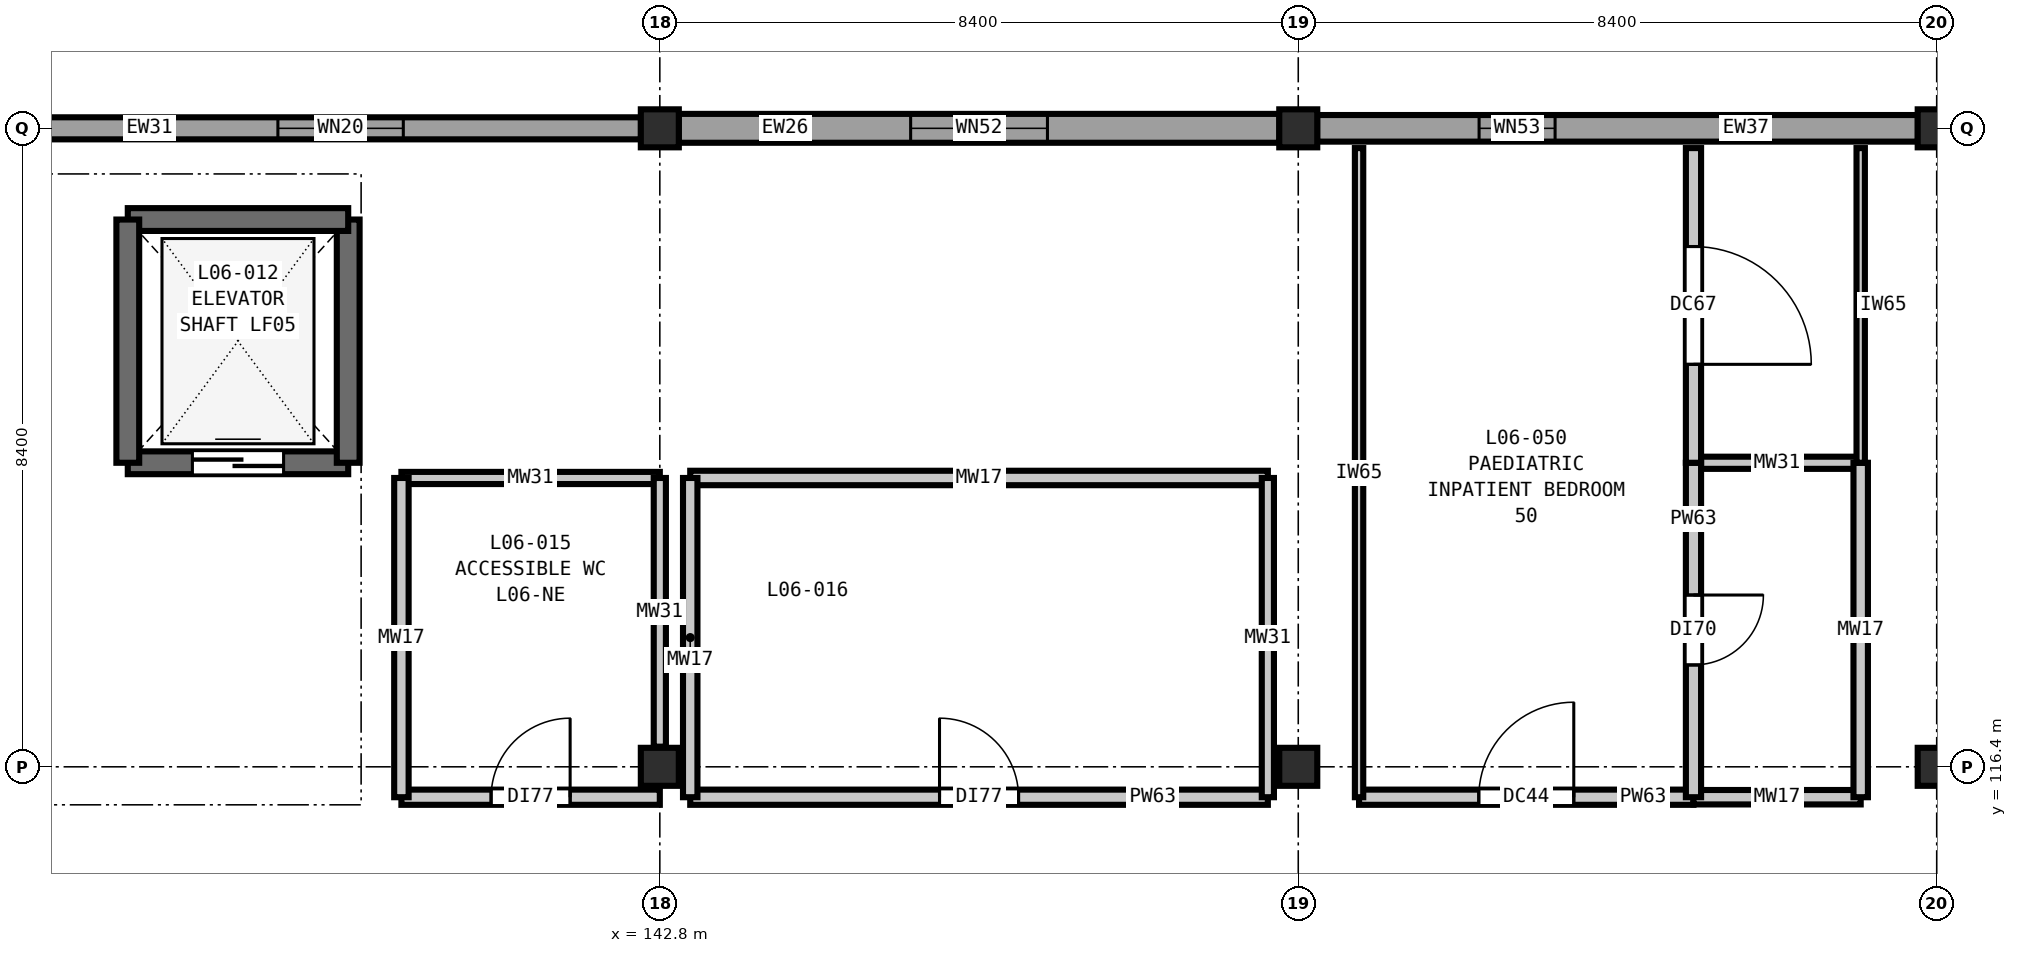
"""IFC4 building model, lengths in metres.
Left out: names, types, materials, properties, quantities, classifications, styles, units other than length and angle.
Written with IfcOpenShell. Run it as: python <this file> out.ifc"""

import sys

from ifc_helpers import new_model, si_unit, direction, frame, frame_2d, origin, origin_2d, place, context, subcontext, project, spatial, rectangle, extrude, element, fill, save


model = new_model("IFC4")
c1 = context("Model", 3, precision=1e-05, world=origin(), true_north=direction((0.0, 1.0)))
c2 = subcontext(c1, "Body", "Model", "MODEL_VIEW")
j1 = project(units=[si_unit("LENGTHUNIT", "METRE"), si_unit("PLANEANGLEUNIT", "RADIAN")], contexts=[c1])
p1 = place(None, origin())
s1 = spatial("IfcSite", under=j1, at=p1, CompositionType="ELEMENT")
p2 = place(p1, origin())
s2 = spatial("IfcBuilding", under=s1, at=p2, CompositionType="ELEMENT")
p3 = place(p2, frame((0.0, 0.0, 28.8)))
s3 = spatial("IfcBuildingStorey", under=s2, at=p3, CompositionType="ELEMENT", Elevation=28.8)
for number, where, z_axis, x_axis in (
    (1, (142.8, 116.4, 0.0), (0.0, 0.0, 1.0), (1.0, 0.0, 0.0)),
    (2, (142.8, 124.8, 0.0), (0.0, 0.0, 1.0), (1.0, 0.0, 0.0)),
    (3, (151.2, 116.4, 0.0), (0.0, 0.0, 1.0), (1.0, 0.0, 0.0)),
    (4, (151.2, 124.8, 0.0), (0.0, 0.0, 1.0), (1.0, 0.0, 0.0)),
    (5, (159.6, 116.4, 0.0), (0.0, 0.0, 1.0), (1.0, 0.0, 0.0)),
    (6, (159.6, 124.8, 0.0), (0.0, 0.0, 1.0), (1.0, 0.0, 0.0)),
):
    element("IfcColumn", number, at=place(p3, frame(where, z_axis=z_axis, x_axis=x_axis)), inside=s3, PredefinedType="COLUMN", context=c2, shape_type="SweptSolid", body=[
        extrude(rectangle(XDim=0.5, YDim=0.5, at=origin_2d()), origin(), (0.0, 0.0, 1.0), 4.2),
    ])
p4 = place(p3, frame((134.648, 124.8, 0.0), z_axis=(0.0, 0.0, 1.0), x_axis=(1.0, 0.0, 0.0)))
e7 = element("IfcWall", 7, at=p4, inside=s3, PredefinedType="SOLIDWALL", context=c2, shape_type="SweptSolid", body=[
    extrude(rectangle(XDim=7.904, YDim=0.29, at=frame_2d((3.952, 0.0))), origin(), (0.0, 0.0, 1.0), 3.48),
])
p5 = place(p4, frame((3.127, 0.0, 0.9)))
e8 = element("IfcOpeningElement", 8, at=p5, cuts=e7, PredefinedType="OPENING", context=c2, shape_type="SweptSolid", body=[
    extrude(rectangle(XDim=1.65, YDim=1.55, at=frame_2d((0.825, 0.775))), frame((0.0, 0.155, 0.0), z_axis=(0.0, -1.0, 0.0), x_axis=(1.0, 0.0, 0.0)), (0.0, 0.0, 1.0), 0.31),
])
p6 = place(p3, frame((143.048, 124.8, 0.0), z_axis=(0.0, 0.0, 1.0), x_axis=(1.0, 0.0, 0.0)))
e9 = element("IfcWall", 9, at=p6, inside=s3, PredefinedType="SOLIDWALL", context=c2, shape_type="SweptSolid", body=[
    extrude(rectangle(XDim=7.904, YDim=0.38, at=frame_2d((3.952, 0.0))), origin(), (0.0, 0.0, 1.0), 3.48),
])
p7 = place(p6, frame((3.052, 0.0, 0.9)))
e10 = element("IfcOpeningElement", 10, at=p7, cuts=e9, PredefinedType="OPENING", context=c2, shape_type="SweptSolid", body=[
    extrude(rectangle(XDim=1.8, YDim=1.55, at=frame_2d((0.9, 0.775))), frame((0.0, 0.2, 0.0), z_axis=(0.0, -1.0, 0.0), x_axis=(1.0, 0.0, 0.0)), (0.0, 0.0, 1.0), 0.4),
])
p8 = place(p3, frame((151.448, 124.8, 0.0), z_axis=(0.0, 0.0, 1.0), x_axis=(1.0, 0.0, 0.0)))
e11 = element("IfcWall", 11, at=p8, inside=s3, PredefinedType="SOLIDWALL", context=c2, shape_type="SweptSolid", body=[
    extrude(rectangle(XDim=7.904, YDim=0.35, at=frame_2d((3.952, 0.0))), origin(), (0.0, 0.0, 1.0), 3.48),
])
p9 = place(p8, frame((2.131, 0.0, 0.9)))
e12 = element("IfcOpeningElement", 12, at=p9, cuts=e11, PredefinedType="OPENING", context=c2, shape_type="SweptSolid", body=[
    extrude(rectangle(XDim=1.0, YDim=1.75, at=frame_2d((0.5, 0.875))), frame((0.0, 0.185, 0.0), z_axis=(0.0, -1.0, 0.0), x_axis=(1.0, 0.0, 0.0)), (0.0, 0.0, 1.0), 0.37),
])
p10 = place(p3, frame((135.8, 120.4, 0.0), z_axis=(0.0, 0.0, 1.0), x_axis=(1.0, 0.0, 0.0)))
e13 = element("IfcWall", 13, at=p10, inside=s3, PredefinedType="SHEAR", context=c2, shape_type="SweptSolid", body=[
    extrude(rectangle(XDim=2.9, YDim=0.3, at=frame_2d((1.45, 0.0))), origin(), (0.0, 0.0, 1.0), 4.2),
])
p11 = place(p10, frame((0.85, 0.0, 0.0)))
e14 = element("IfcOpeningElement", 14, at=p11, cuts=e13, PredefinedType="OPENING", context=c2, shape_type="SweptSolid", body=[
    extrude(rectangle(XDim=1.2, YDim=2.2, at=frame_2d((0.6, 1.1))), frame((0.0, 0.16, 0.0), z_axis=(0.0, -1.0, 0.0), x_axis=(1.0, 0.0, 0.0)), (0.0, 0.0, 1.0), 0.32),
])
p12 = place(p3, frame((138.7, 120.4, 0.0), z_axis=(0.0, 0.0, 1.0), x_axis=(0.0, 1.0, 0.0)))
e15 = element("IfcWall", 15, at=p12, inside=s3, PredefinedType="SHEAR", context=c2, shape_type="SweptSolid", body=[
    extrude(rectangle(XDim=3.2, YDim=0.3, at=frame_2d((1.6, 0.0))), origin(), (0.0, 0.0, 1.0), 4.2),
])
p13 = place(p3, frame((138.7, 123.6, 0.0), z_axis=(0.0, 0.0, 1.0), x_axis=(-1.0, 0.0, 0.0)))
e16 = element("IfcWall", 16, at=p13, inside=s3, PredefinedType="SHEAR", context=c2, shape_type="SweptSolid", body=[
    extrude(rectangle(XDim=2.9, YDim=0.3, at=frame_2d((1.45, 0.0))), origin(), (0.0, 0.0, 1.0), 4.2),
])
p14 = place(p3, frame((135.8, 123.6, 0.0), z_axis=(0.0, 0.0, 1.0), x_axis=(0.0, -1.0, 0.0)))
e17 = element("IfcWall", 17, at=p14, inside=s3, PredefinedType="SHEAR", context=c2, shape_type="SweptSolid", body=[
    extrude(rectangle(XDim=3.2, YDim=0.3, at=frame_2d((1.6, 0.0))), origin(), (0.0, 0.0, 1.0), 4.2),
])
p15 = place(p3, frame((139.4, 116.0, 0.0), z_axis=(0.0, 0.0, 1.0), x_axis=(1.0, 0.0, 0.0)))
e18 = element("IfcWall", 18, at=p15, inside=s3, PredefinedType="PARTITIONING", context=c2, shape_type="SweptSolid", body=[
    extrude(rectangle(XDim=3.4, YDim=0.2, at=frame_2d((1.7, 0.0))), origin(), (0.0, 0.0, 1.0), 3.92),
])
p16 = place(p15, frame((1.18, 0.0, 0.0)))
e19 = element("IfcOpeningElement", 19, at=p16, cuts=e18, PredefinedType="OPENING", context=c2, shape_type="SweptSolid", body=[
    extrude(rectangle(XDim=1.04, YDim=2.1, at=frame_2d((0.52, 1.05))), frame((0.0, 0.11, 0.0), z_axis=(0.0, -1.0, 0.0), x_axis=(1.0, 0.0, 0.0)), (0.0, 0.0, 1.0), 0.22),
])
p17 = place(p3, frame((143.2, 116.0, 0.0), z_axis=(0.0, 0.0, 1.0), x_axis=(1.0, 0.0, 0.0)))
e20 = element("IfcWall", 20, at=p17, inside=s3, PredefinedType="PARTITIONING", context=c2, shape_type="SweptSolid", body=[
    extrude(rectangle(XDim=7.6, YDim=0.2, at=frame_2d((3.8, 0.0))), origin(), (0.0, 0.0, 1.0), 3.92),
])
p18 = place(p17, frame((3.28, 0.0, 0.0)))
e21 = element("IfcOpeningElement", 21, at=p18, cuts=e20, PredefinedType="OPENING", context=c2, shape_type="SweptSolid", body=[
    extrude(rectangle(XDim=1.04, YDim=2.1, at=frame_2d((0.52, 1.05))), frame((0.0, 0.11, 0.0), z_axis=(0.0, -1.0, 0.0), x_axis=(1.0, 0.0, 0.0)), (0.0, 0.0, 1.0), 0.22),
])
p19 = place(p3, frame((152.0, 116.0, 0.0), z_axis=(0.0, 0.0, 1.0), x_axis=(1.0, 0.0, 0.0)))
e22 = element("IfcWall", 22, at=p19, inside=s3, PredefinedType="PARTITIONING", context=c2, shape_type="SweptSolid", body=[
    extrude(rectangle(XDim=4.4, YDim=0.2, at=frame_2d((2.2, 0.0))), origin(), (0.0, 0.0, 1.0), 3.92),
])
p20 = place(p19, frame((1.575, 0.0, 0.0)))
e23 = element("IfcOpeningElement", 23, at=p20, cuts=e22, PredefinedType="OPENING", context=c2, shape_type="SweptSolid", body=[
    extrude(rectangle(XDim=1.25, YDim=2.15, at=frame_2d((0.625, 1.075))), frame((0.0, 0.11, 0.0), z_axis=(0.0, -1.0, 0.0), x_axis=(1.0, 0.0, 0.0)), (0.0, 0.0, 1.0), 0.22),
])
p21 = place(p3, frame((156.4, 116.0, 0.0), z_axis=(0.0, 0.0, 1.0), x_axis=(1.0, 0.0, 0.0)))
e24 = element("IfcWall", 24, at=p21, inside=s3, PredefinedType="PLUMBINGWALL", context=c2, shape_type="SweptSolid", body=[
    extrude(rectangle(XDim=2.2, YDim=0.19, at=frame_2d((1.1, 0.0))), origin(), (0.0, 0.0, 1.0), 3.92),
])
p22 = place(p3, frame((139.4, 120.2, 0.0), z_axis=(0.0, 0.0, 1.0), x_axis=(1.0, 0.0, 0.0)))
e25 = element("IfcWall", 25, at=p22, inside=s3, PredefinedType="PLUMBINGWALL", context=c2, shape_type="SweptSolid", body=[
    extrude(rectangle(XDim=3.4, YDim=0.16, at=frame_2d((1.7, 0.0))), origin(), (0.0, 0.0, 1.0), 3.92),
])
p23 = place(p3, frame((143.2, 120.2, 0.0), z_axis=(0.0, 0.0, 1.0), x_axis=(1.0, 0.0, 0.0)))
e26 = element("IfcWall", 26, at=p23, inside=s3, PredefinedType="PLUMBINGWALL", context=c2, shape_type="SweptSolid", body=[
    extrude(rectangle(XDim=7.6, YDim=0.19, at=frame_2d((3.8, 0.0))), origin(), (0.0, 0.0, 1.0), 3.92),
])
p24 = place(p3, frame((156.4, 120.4, 0.0), z_axis=(0.0, 0.0, 1.0), x_axis=(1.0, 0.0, 0.0)))
e27 = element("IfcWall", 27, at=p24, inside=s3, PredefinedType="PLUMBINGWALL", context=c2, shape_type="SweptSolid", body=[
    extrude(rectangle(XDim=2.2, YDim=0.16, at=frame_2d((1.1, 0.0))), origin(), (0.0, 0.0, 1.0), 3.92),
])
p25 = place(p3, frame((139.4, 116.0, 0.0), z_axis=(0.0, 0.0, 1.0), x_axis=(0.0, 1.0, 0.0)))
e28 = element("IfcWall", 28, at=p25, inside=s3, PredefinedType="PLUMBINGWALL", context=c2, shape_type="SweptSolid", body=[
    extrude(rectangle(XDim=4.2, YDim=0.19, at=frame_2d((2.1, 0.0))), origin(), (0.0, 0.0, 1.0), 3.92),
])
p26 = place(p3, frame((142.8, 116.665, 0.0), z_axis=(0.0, 0.0, 1.0), x_axis=(0.0, 1.0, 0.0)))
e29 = element("IfcWall", 29, at=p26, inside=s3, PredefinedType="PLUMBINGWALL", context=c2, shape_type="SweptSolid", body=[
    extrude(rectangle(XDim=3.535, YDim=0.16, at=frame_2d((1.768, 0.0))), origin(), (0.0, 0.0, 1.0), 3.635),
])
p27 = place(p3, frame((143.2, 116.0, 0.0), z_axis=(0.0, 0.0, 1.0), x_axis=(0.0, 1.0, 0.0)))
e30 = element("IfcWall", 30, at=p27, inside=s3, PredefinedType="PLUMBINGWALL", context=c2, shape_type="SweptSolid", body=[
    extrude(rectangle(XDim=4.2, YDim=0.19, at=frame_2d((2.1, 0.0))), origin(), (0.0, 0.0, 1.0), 3.92),
])
p28 = place(p3, frame((150.8, 116.0, 0.0), z_axis=(0.0, 0.0, 1.0), x_axis=(0.0, 1.0, 0.0)))
e31 = element("IfcWall", 31, at=p28, inside=s3, PredefinedType="PLUMBINGWALL", context=c2, shape_type="SweptSolid", body=[
    extrude(rectangle(XDim=4.2, YDim=0.16, at=frame_2d((2.1, 0.0))), origin(), (0.0, 0.0, 1.0), 3.92),
])
p29 = place(p3, frame((152.0, 116.0, 0.0), z_axis=(0.0, 0.0, 1.0), x_axis=(0.0, 1.0, 0.0)))
e32 = element("IfcWall", 32, at=p29, inside=s3, PredefinedType="PARTITIONING", context=c2, shape_type="SweptSolid", body=[
    extrude(rectangle(XDim=8.54, YDim=0.11, at=frame_2d((4.27, 0.0))), origin(), (0.0, 0.0, 1.0), 3.92),
])
p30 = place(p3, frame((156.4, 116.0, 0.0), z_axis=(0.0, 0.0, 1.0), x_axis=(0.0, 1.0, 0.0)))
e33 = element("IfcWall", 33, at=p30, inside=s3, PredefinedType="PARTITIONING", context=c2, shape_type="SweptSolid", body=[
    extrude(rectangle(XDim=4.4, YDim=0.2, at=frame_2d((2.2, 0.0))), origin(), (0.0, 0.0, 1.0), 3.92),
])
p31 = place(p30, frame((1.74, 0.0, 0.0)))
e34 = element("IfcOpeningElement", 34, at=p31, cuts=e33, PredefinedType="OPENING", context=c2, shape_type="SweptSolid", body=[
    extrude(rectangle(XDim=0.92, YDim=2.1, at=frame_2d((0.46, 1.05))), frame((0.0, 0.11, 0.0), z_axis=(0.0, -1.0, 0.0), x_axis=(1.0, 0.0, 0.0)), (0.0, 0.0, 1.0), 0.22),
])
p32 = place(p3, frame((156.4, 120.4, 0.0), z_axis=(0.0, 0.0, 1.0), x_axis=(0.0, 1.0, 0.0)))
e35 = element("IfcWall", 35, at=p32, inside=s3, PredefinedType="PARTITIONING", context=c2, shape_type="SweptSolid", body=[
    extrude(rectangle(XDim=4.14, YDim=0.2, at=frame_2d((2.07, 0.0))), origin(), (0.0, 0.0, 1.0), 3.92),
])
p33 = place(p32, frame((1.295, 0.0, 0.0)))
e36 = element("IfcOpeningElement", 36, at=p33, cuts=e35, PredefinedType="OPENING", context=c2, shape_type="SweptSolid", body=[
    extrude(rectangle(XDim=1.55, YDim=2.25, at=frame_2d((0.775, 1.125))), frame((0.0, 0.11, 0.0), z_axis=(0.0, -1.0, 0.0), x_axis=(1.0, 0.0, 0.0)), (0.0, 0.0, 1.0), 0.22),
])
p34 = place(p3, frame((158.6, 116.0, 0.0), z_axis=(0.0, 0.0, 1.0), x_axis=(0.0, 1.0, 0.0)))
e37 = element("IfcWall", 37, at=p34, inside=s3, PredefinedType="PLUMBINGWALL", context=c2, shape_type="SweptSolid", body=[
    extrude(rectangle(XDim=4.4, YDim=0.19, at=frame_2d((2.2, 0.0))), origin(), (0.0, 0.0, 1.0), 3.92),
])
p35 = place(p3, frame((158.6, 120.4, 0.0), z_axis=(0.0, 0.0, 1.0), x_axis=(0.0, 1.0, 0.0)))
e38 = element("IfcWall", 38, at=p35, inside=s3, PredefinedType="PARTITIONING", context=c2, shape_type="SweptSolid", body=[
    extrude(rectangle(XDim=4.14, YDim=0.11, at=frame_2d((2.07, 0.0))), origin(), (0.0, 0.0, 1.0), 3.92),
])
p36 = place(p5, origin())
e39 = element("IfcWindow", 39, at=p36, inside=s3, PartitioningType="DOUBLE_PANEL_VERTICAL", PredefinedType="WINDOW", context=c2, shape_type="SweptSolid", body=[
    extrude(rectangle(XDim=1.65, YDim=1.55, at=frame_2d((0.825, 0.775))), frame((0.0, 0.03, 0.0), z_axis=(0.0, -1.0, 0.0), x_axis=(1.0, 0.0, 0.0)), (0.0, 0.0, 1.0), 0.06),
])
fill(e8, e39)
p37 = place(p7, origin())
e40 = element("IfcWindow", 40, at=p37, inside=s3, PartitioningType="DOUBLE_PANEL_VERTICAL", PredefinedType="WINDOW", context=c2, shape_type="SweptSolid", body=[
    extrude(rectangle(XDim=1.8, YDim=1.55, at=frame_2d((0.9, 0.775))), frame((0.0, 0.03, 0.0), z_axis=(0.0, -1.0, 0.0), x_axis=(1.0, 0.0, 0.0)), (0.0, 0.0, 1.0), 0.06),
])
fill(e10, e40)
p38 = place(p9, origin())
e41 = element("IfcWindow", 41, at=p38, inside=s3, PartitioningType="SINGLE_PANEL", PredefinedType="WINDOW", context=c2, shape_type="SweptSolid", body=[
    extrude(rectangle(XDim=1.0, YDim=1.75, at=frame_2d((0.5, 0.875))), frame((0.0, 0.03, 0.0), z_axis=(0.0, -1.0, 0.0), x_axis=(1.0, 0.0, 0.0)), (0.0, 0.0, 1.0), 0.06),
])
fill(e12, e41)
p39 = place(p11, origin())
e42 = element("IfcDoor", 42, at=p39, inside=s3, OperationType="DOUBLE_DOOR_SLIDING", PredefinedType="DOOR", context=c2, shape_type="SweptSolid", body=[
    extrude(rectangle(XDim=1.2, YDim=2.2, at=frame_2d((0.6, 1.1))), frame((0.0, 0.025, 0.0), z_axis=(0.0, -1.0, 0.0), x_axis=(1.0, 0.0, 0.0)), (0.0, 0.0, 1.0), 0.05),
])
fill(e14, e42)
p40 = place(p16, origin())
e43 = element("IfcDoor", 43, at=p40, inside=s3, OperationType="SINGLE_SWING_RIGHT", PredefinedType="DOOR", context=c2, shape_type="SweptSolid", body=[
    extrude(rectangle(XDim=1.04, YDim=2.1, at=frame_2d((0.52, 1.05))), frame((0.0, 0.025, 0.0), z_axis=(0.0, -1.0, 0.0), x_axis=(1.0, 0.0, 0.0)), (0.0, 0.0, 1.0), 0.05),
])
fill(e19, e43)
p41 = place(p18, origin())
e44 = element("IfcDoor", 44, at=p41, inside=s3, OperationType="SINGLE_SWING_LEFT", PredefinedType="DOOR", context=c2, shape_type="SweptSolid", body=[
    extrude(rectangle(XDim=1.04, YDim=2.1, at=frame_2d((0.52, 1.05))), frame((0.0, 0.025, 0.0), z_axis=(0.0, -1.0, 0.0), x_axis=(1.0, 0.0, 0.0)), (0.0, 0.0, 1.0), 0.05),
])
fill(e21, e44)
p42 = place(p20, origin())
e45 = element("IfcDoor", 45, at=p42, inside=s3, OperationType="SINGLE_SWING_RIGHT", PredefinedType="DOOR", context=c2, shape_type="SweptSolid", body=[
    extrude(rectangle(XDim=1.25, YDim=2.15, at=frame_2d((0.625, 1.075))), frame((0.0, 0.025, 0.0), z_axis=(0.0, -1.0, 0.0), x_axis=(1.0, 0.0, 0.0)), (0.0, 0.0, 1.0), 0.05),
])
fill(e23, e45)
p43 = place(p31, frame((0.92, 0.0, 0.0), z_axis=(0.0, 0.0, 1.0), x_axis=(-1.0, 0.0, 0.0)))
e46 = element("IfcDoor", 46, at=p43, inside=s3, OperationType="SINGLE_SWING_LEFT", PredefinedType="DOOR", context=c2, shape_type="SweptSolid", body=[
    extrude(rectangle(XDim=0.92, YDim=2.1, at=frame_2d((0.46, 1.05))), frame((0.0, 0.025, 0.0), z_axis=(0.0, -1.0, 0.0), x_axis=(1.0, 0.0, 0.0)), (0.0, 0.0, 1.0), 0.05),
])
fill(e34, e46)
p44 = place(p33, frame((1.55, 0.0, 0.0), z_axis=(0.0, 0.0, 1.0), x_axis=(-1.0, 0.0, 0.0)))
e47 = element("IfcDoor", 47, at=p44, inside=s3, OperationType="SINGLE_SWING_RIGHT", PredefinedType="DOOR", context=c2, shape_type="SweptSolid", body=[
    extrude(rectangle(XDim=1.55, YDim=2.25, at=frame_2d((0.775, 1.125))), frame((0.0, 0.025, 0.0), z_axis=(0.0, -1.0, 0.0), x_axis=(1.0, 0.0, 0.0)), (0.0, 0.0, 1.0), 0.05),
])
fill(e36, e47)
save(model, sys.argv[1])
